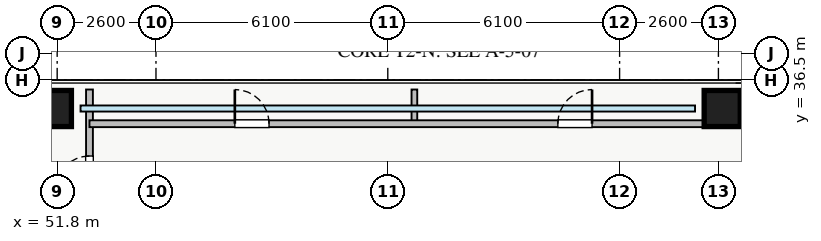
"""IFC4 building model, lengths in metres.
Left out: names, types, materials, properties, quantities, classifications, styles, units other than length and angle.
Written with IfcOpenShell. Run it as: python <this file> out.ifc"""

import sys

from ifc_helpers import new_model, si_unit, direction, frame, frame_2d, origin, origin_2d, place, context, subcontext, project, spatial, rectangle, extrude, source, transform, mapped, element, fill, save


model = new_model("IFC4")
c1 = context("Model", 3, precision=1e-05, world=origin(), true_north=direction((0.0, 1.0)))
c2 = subcontext(c1, "Body", "Model", "MODEL_VIEW")
j1 = project(units=[si_unit("LENGTHUNIT", "METRE"), si_unit("PLANEANGLEUNIT", "RADIAN")], contexts=[c1])
p1 = place(None, origin())
s1 = spatial("IfcSite", under=j1, at=p1, CompositionType="ELEMENT")
p2 = place(p1, origin())
s2 = spatial("IfcBuilding", under=s1, at=p2, CompositionType="ELEMENT")
p3 = place(p2, frame((0.0, 0.0, 63.25)))
s3 = spatial("IfcBuildingStorey", under=s2, at=p3, CompositionType="ELEMENT", Elevation=63.25)
m1 = source(origin(), c2, "Body", "SweptSolid", [
    extrude(rectangle(XDim=0.95, YDim=0.95, at=origin_2d()), origin(), (0.0, 0.0, 1.0), 3.25),
])
for number, where, z_axis, x_axis in (
    (1, (69.3, 35.75, 0.0), (0.0, 0.0, 1.0), (1.0, 0.0, 0.0)),
    (2, (51.7, 35.75, 0.0), (0.0, 0.0, 1.0), (1.0, 0.0, 0.0)),
):
    element("IfcColumn", number, at=place(p3, frame(where, z_axis=z_axis, x_axis=x_axis)), inside=s3, PredefinedType="COLUMN", context=c2, shape_type="MappedRepresentation", body=[
        mapped(m1, transform((0.0, 0.0, 0.0), x_axis=(1.0, 0.0, 0.0), y_axis=(0.0, 1.0, 0.0), z_axis=(0.0, 0.0, 1.0), scale=1.0)),
    ])
p4 = place(p3, frame((52.65, 9.75, 0.0), z_axis=(0.0, 0.0, 1.0), x_axis=(0.0, 1.0, 0.0)))
e3 = element("IfcWall", 3, at=p4, inside=s3, PredefinedType="PARTITIONING", context=c2, shape_type="SweptSolid", body=[
    extrude(rectangle(XDim=26.5, YDim=0.18, at=frame_2d((13.25, 0.0))), origin(), (0.0, 0.0, 1.0), 3.07),
])
p5 = place(p4, frame((23.85, 0.0, 0.0)))
e4 = element("IfcOpeningElement", 4, at=p5, cuts=e3, PredefinedType="OPENING", context=c2, shape_type="SweptSolid", body=[
    extrude(rectangle(XDim=0.9, YDim=2.05, at=frame_2d((0.45, 1.025))), frame((0.0, 0.1, 0.0), z_axis=(0.0, -1.0, 0.0), x_axis=(1.0, 0.0, 0.0)), (0.0, 0.0, 1.0), 0.2),
])
p6 = place(p4, frame((1.75, 0.0, 0.0)))
e5 = element("IfcOpeningElement", 5, at=p6, cuts=e3, PredefinedType="OPENING", context=c2, shape_type="SweptSolid", body=[
    extrude(rectangle(XDim=0.9, YDim=2.05, at=frame_2d((0.45, 1.025))), frame((0.0, 0.1, 0.0), z_axis=(0.0, -1.0, 0.0), x_axis=(1.0, 0.0, 0.0)), (0.0, 0.0, 1.0), 0.2),
])
p7 = place(p4, frame((5.355, 0.0, 0.0)))
e6 = element("IfcOpeningElement", 6, at=p7, cuts=e3, PredefinedType="OPENING", context=c2, shape_type="SweptSolid", body=[
    extrude(rectangle(XDim=1.0, YDim=2.05, at=frame_2d((0.5, 1.025))), frame((0.0, 0.1, 0.0), z_axis=(0.0, -1.0, 0.0), x_axis=(1.0, 0.0, 0.0)), (0.0, 0.0, 1.0), 0.2),
])
p8 = place(p4, frame((15.195, 0.0, 0.0)))
e7 = element("IfcOpeningElement", 7, at=p8, cuts=e3, PredefinedType="OPENING", context=c2, shape_type="SweptSolid", body=[
    extrude(rectangle(XDim=1.0, YDim=2.05, at=frame_2d((0.5, 1.025))), frame((0.0, 0.1, 0.0), z_axis=(0.0, -1.0, 0.0), x_axis=(1.0, 0.0, 0.0)), (0.0, 0.0, 1.0), 0.2),
])
for number, where, z_axis, x_axis in (
    (8, (61.2, 35.35, 0.0), (0.0, 0.0, 1.0), (0.0, 1.0, 0.0)),
    (9, (69.65, 35.35, 0.0), (0.0, 0.0, 1.0), (0.0, 1.0, 0.0)),
):
    element("IfcWall", number, at=place(p3, frame(where, z_axis=z_axis, x_axis=x_axis)), inside=s3, PredefinedType="PARTITIONING", context=c2, shape_type="SweptSolid", body=[
        extrude(rectangle(XDim=0.9, YDim=0.15, at=frame_2d((0.45, 0.0))), origin(), (0.0, 0.0, 1.0), 3.07),
    ])
p9 = place(p3, frame((52.65, 35.35, 0.0), z_axis=(0.0, 0.0, 1.0), x_axis=(1.0, 0.0, 0.0)))
e10 = element("IfcWall", 10, at=p9, inside=s3, PredefinedType="PARTITIONING", context=c2, shape_type="SweptSolid", body=[
    extrude(rectangle(XDim=17.0, YDim=0.18, at=frame_2d((8.5, 0.0))), origin(), (0.0, 0.0, 1.0), 3.07),
])
p10 = place(p9, frame((3.825, 0.0, 0.0)))
e11 = element("IfcOpeningElement", 11, at=p10, cuts=e10, PredefinedType="OPENING", context=c2, shape_type="SweptSolid", body=[
    extrude(rectangle(XDim=0.9, YDim=2.05, at=frame_2d((0.45, 1.025))), frame((0.0, 0.1, 0.0), z_axis=(0.0, -1.0, 0.0), x_axis=(1.0, 0.0, 0.0)), (0.0, 0.0, 1.0), 0.2),
])
p11 = place(p9, frame((12.325, 0.0, 0.0)))
e12 = element("IfcOpeningElement", 12, at=p11, cuts=e10, PredefinedType="OPENING", context=c2, shape_type="SweptSolid", body=[
    extrude(rectangle(XDim=0.9, YDim=2.05, at=frame_2d((0.45, 1.025))), frame((0.0, 0.1, 0.0), z_axis=(0.0, -1.0, 0.0), x_axis=(1.0, 0.0, 0.0)), (0.0, 0.0, 1.0), 0.2),
])
m2 = source(origin(), c2, "Body", "SweptSolid", [
    extrude(rectangle(XDim=0.9, YDim=2.05, at=frame_2d((0.45, 1.025))), frame((0.0, 0.025, 0.0), z_axis=(0.0, -1.0, 0.0), x_axis=(1.0, 0.0, 0.0)), (0.0, 0.0, 1.0), 0.05),
])
p12 = place(p5, origin())
e13 = element("IfcDoor", 13, at=p12, inside=s3, OperationType="SINGLE_SWING_LEFT", PredefinedType="DOOR", context=c2, shape_type="MappedRepresentation", body=[
    mapped(m2, transform((0.0, 0.0, 0.0), x_axis=(1.0, 0.0, 0.0), y_axis=(0.0, 1.0, 0.0), z_axis=(0.0, 0.0, 1.0), scale=1.0)),
])
fill(e4, e13)
p13 = place(p10, origin())
e14 = element("IfcDoor", 14, at=p13, inside=s3, OperationType="SINGLE_SWING_LEFT", PredefinedType="DOOR", context=c2, shape_type="MappedRepresentation", body=[
    mapped(m2, transform((0.0, 0.0, 0.0), x_axis=(1.0, 0.0, 0.0), y_axis=(0.0, 1.0, 0.0), z_axis=(0.0, 0.0, 1.0), scale=1.0)),
])
fill(e11, e14)
p14 = place(p11, origin())
e15 = element("IfcDoor", 15, at=p14, inside=s3, OperationType="SINGLE_SWING_RIGHT", PredefinedType="DOOR", context=c2, shape_type="MappedRepresentation", body=[
    mapped(m2, transform((0.0, 0.0, 0.0), x_axis=(1.0, 0.0, 0.0), y_axis=(0.0, 1.0, 0.0), z_axis=(0.0, 0.0, 1.0), scale=1.0)),
])
fill(e12, e15)
save(model, sys.argv[1])
